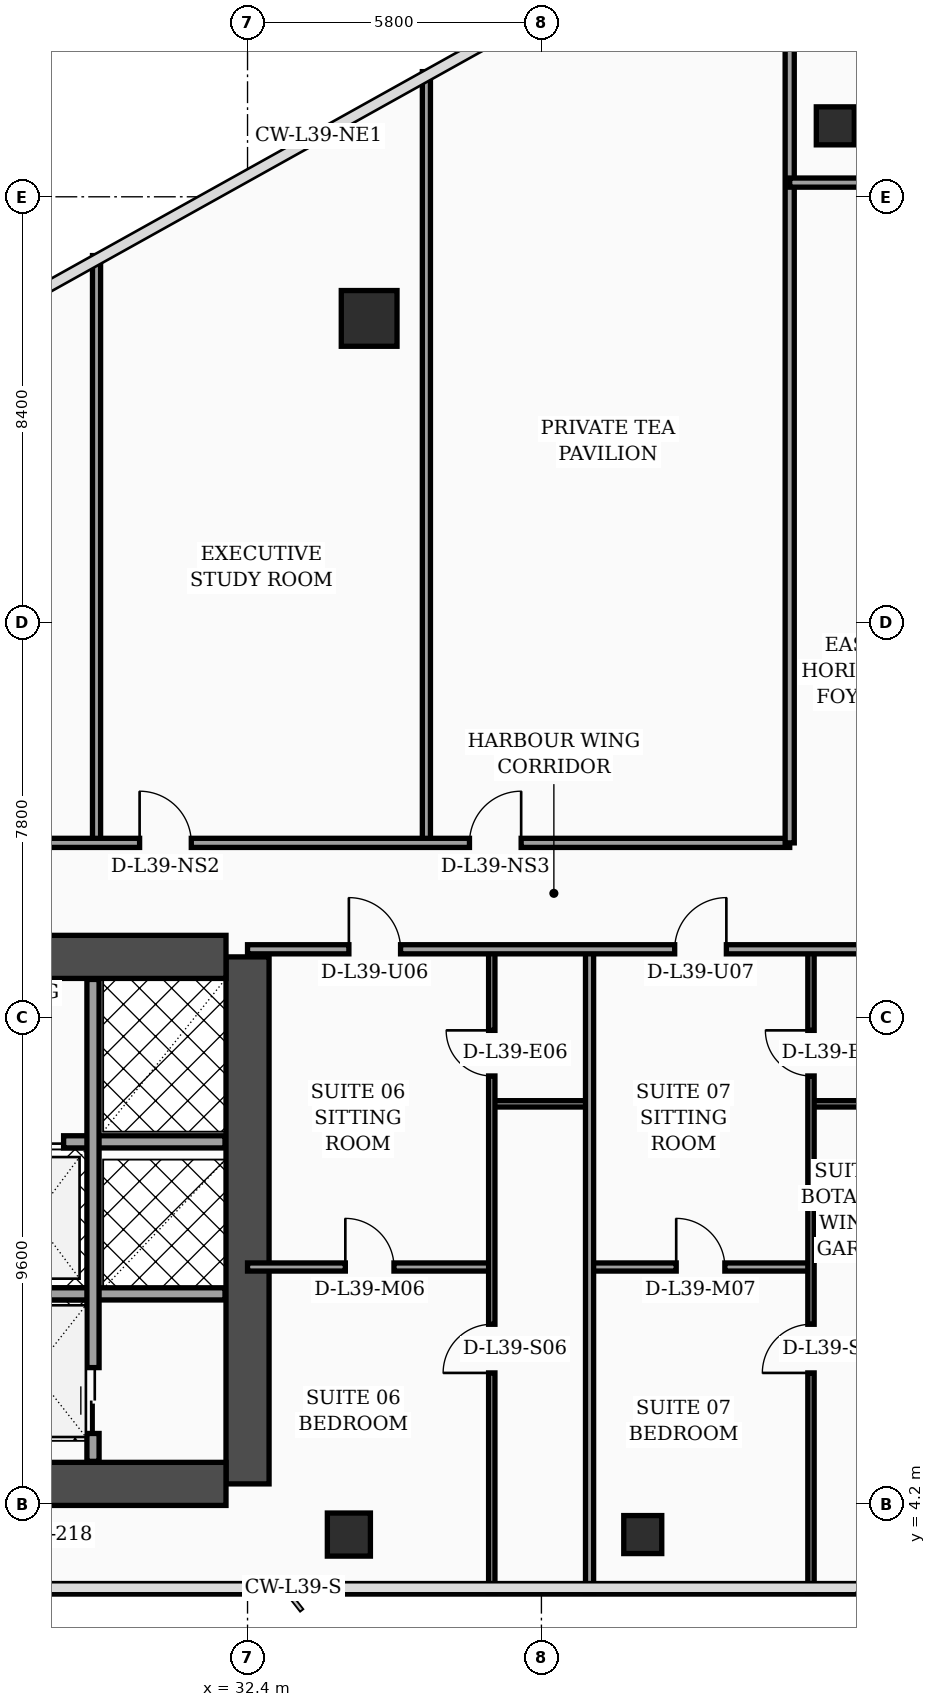
"""IFC4 building model, lengths in metres.
Left out: names, types, materials, properties, quantities, classifications, styles, units other than length and angle.
Written with IfcOpenShell. Run it as: python <this file> out.ifc"""

import sys

from ifc_helpers import new_model, si_unit, direction, frame, frame_2d, origin, origin_2d, place, context, subcontext, project, spatial, rectangle, hollow_rectangle, circle, extrude, element, fill, save


model = new_model("IFC4")
c1 = context("Model", 3, precision=1e-05, world=origin(), true_north=direction((0.0, 1.0)))
c2 = subcontext(c1, "Body", "Model", "MODEL_VIEW")
j1 = project(units=[si_unit("LENGTHUNIT", "METRE"), si_unit("PLANEANGLEUNIT", "RADIAN")], contexts=[c1])
p1 = place(None, origin())
s1 = spatial("IfcSite", under=j1, at=p1, CompositionType="ELEMENT")
p2 = place(p1, origin())
s2 = spatial("IfcBuilding", under=s1, at=p2, CompositionType="ELEMENT")
p3 = place(p2, frame((0.0, 0.0, 159.9)))
s3 = spatial("IfcBuildingStorey", under=s2, at=p3, CompositionType="ELEMENT", Elevation=159.9)
p4 = place(p3, frame((32.4, 4.6, 0.0), z_axis=(0.0, 0.0, 1.0), x_axis=(0.0, 1.0, 0.0)))
e1 = element("IfcWall", 1, at=p4, inside=s3, PredefinedType="SHEAR", context=c2, shape_type="SweptSolid", body=[
    extrude(rectangle(XDim=10.4, YDim=0.85, at=frame_2d((5.2, 0.0))), origin(), (0.0, 0.0, 1.0), 3.56),
])
p5 = place(p3, frame((22.025, 15.0, 0.0), z_axis=(0.0, 0.0, 1.0), x_axis=(1.0, 0.0, 0.0)))
e2 = element("IfcWall", 2, at=p5, inside=s3, PredefinedType="SHEAR", context=c2, shape_type="SweptSolid", body=[
    extrude(rectangle(XDim=9.95, YDim=0.85, at=frame_2d((4.975, 0.0))), origin(), (0.0, 0.0, 1.0), 3.56),
])
p6 = place(p5, frame((4.88, 0.0, 0.0)))
e3 = element("IfcOpeningElement", 3, at=p6, cuts=e2, PredefinedType="OPENING", context=c2, shape_type="SweptSolid", body=[
    extrude(rectangle(XDim=1.1, YDim=2.2, at=frame_2d((0.55, 1.1))), frame((0.0, 0.435, 0.0), z_axis=(0.0, -1.0, 0.0), x_axis=(1.0, 0.0, 0.0)), (0.0, 0.0, 1.0), 0.87),
])
p7 = place(p3, frame((22.025, 4.6, 0.0), z_axis=(0.0, 0.0, 1.0), x_axis=(1.0, 0.0, 0.0)))
e4 = element("IfcWall", 4, at=p7, inside=s3, PredefinedType="SHEAR", context=c2, shape_type="SweptSolid", body=[
    extrude(rectangle(XDim=9.95, YDim=0.85, at=frame_2d((4.975, 0.0))), origin(), (0.0, 0.0, 1.0), 3.56),
])
p8 = place(p3, frame((34.4, 3.6, 0.0), z_axis=(0.0, 0.0, 1.0), x_axis=(1.0, 0.0, 0.0)))
e5 = element("IfcColumn", 5, at=p8, inside=s3, PredefinedType="COLUMN", context=c2, shape_type="SweptSolid", body=[
    extrude(hollow_rectangle(XDim=0.85, YDim=0.85, WallThickness=0.036, at=origin_2d()), origin(), (0.0, 0.0, 1.0), 3.56),
])
p9 = place(p3, frame((40.2, 3.6, 0.0), z_axis=(0.0, 0.0, 1.0), x_axis=(1.0, 0.0, 0.0)))
e6 = element("IfcColumn", 6, at=p9, inside=s3, PredefinedType="COLUMN", context=c2, shape_type="SweptSolid", body=[
    extrude(hollow_rectangle(XDim=0.75, YDim=0.75, WallThickness=0.032, at=origin_2d()), origin(), (0.0, 0.0, 1.0), 3.56),
])
p10 = place(p3, frame((34.8, 27.6, 0.0), z_axis=(0.0, 0.0, 1.0), x_axis=(1.0, 0.0, 0.0)))
e7 = element("IfcColumn", 7, at=p10, inside=s3, PredefinedType="COLUMN", context=c2, shape_type="SweptSolid", body=[
    extrude(circle(Radius=0.55, at=origin_2d()), origin(), (0.0, 0.0, 1.0), 3.56),
])
p11 = place(p3, frame((44.0, 31.4, 0.0), z_axis=(0.0, 0.0, 1.0), x_axis=(1.0, 0.0, 0.0)))
e8 = element("IfcColumn", 8, at=p11, inside=s3, PredefinedType="COLUMN", context=c2, shape_type="SweptSolid", body=[
    extrude(hollow_rectangle(XDim=0.75, YDim=0.75, WallThickness=0.032, at=origin_2d()), origin(), (0.0, 0.0, 1.0), 3.56),
])
p12 = place(p3, frame((27.02, 11.35, 0.0), z_axis=(0.0, 0.0, 1.0), x_axis=(1.0, 0.0, 0.0)))
e9 = element("IfcWall", 9, at=p12, inside=s3, PredefinedType="SOLIDWALL", context=c2, shape_type="SweptSolid", body=[
    extrude(rectangle(XDim=4.935, YDim=0.24, at=frame_2d((2.468, 0.0))), origin(), (0.0, 0.0, 1.0), 3.56),
])
p13 = place(p12, frame((0.45, 0.0, 0.0)))
e10 = element("IfcOpeningElement", 10, at=p13, cuts=e9, PredefinedType="OPENING", context=c2, shape_type="SweptSolid", body=[
    extrude(rectangle(XDim=1.3, YDim=2.35, at=frame_2d((0.65, 1.175))), frame((0.0, 0.13, 0.0), z_axis=(0.0, -1.0, 0.0), x_axis=(1.0, 0.0, 0.0)), (0.0, 0.0, 1.0), 0.26),
])
p14 = place(p3, frame((27.02, 8.35, 0.0), z_axis=(0.0, 0.0, 1.0), x_axis=(1.0, 0.0, 0.0)))
e11 = element("IfcWall", 11, at=p14, inside=s3, PredefinedType="SOLIDWALL", context=c2, shape_type="SweptSolid", body=[
    extrude(rectangle(XDim=4.935, YDim=0.24, at=frame_2d((2.468, 0.0))), origin(), (0.0, 0.0, 1.0), 3.56),
])
p15 = place(p3, frame((29.35, 5.045, 0.0), z_axis=(0.0, 0.0, 1.0), x_axis=(0.0, 1.0, 0.0)))
e12 = element("IfcWall", 12, at=p15, inside=s3, PredefinedType="SOLIDWALL", context=c2, shape_type="SweptSolid", body=[
    extrude(rectangle(XDim=9.51, YDim=0.24, at=frame_2d((4.755, 0.0))), origin(), (0.0, 0.0, 1.0), 3.56),
])
p16 = place(p15, frame((0.55, 0.0, 0.0)))
e13 = element("IfcOpeningElement", 13, at=p16, cuts=e12, PredefinedType="OPENING", context=c2, shape_type="SweptSolid", body=[
    extrude(rectangle(XDim=1.3, YDim=2.35, at=frame_2d((0.65, 1.175))), frame((0.0, 0.13, 0.0), z_axis=(0.0, -1.0, 0.0), x_axis=(1.0, 0.0, 0.0)), (0.0, 0.0, 1.0), 0.26),
])
p17 = place(p3, frame((37.22, 12.1, 0.0), z_axis=(0.0, 0.0, 1.0), x_axis=(1.0, 0.0, 0.0)))
e14 = element("IfcWall", 14, at=p17, inside=s3, PredefinedType="PARTITIONING", context=c2, shape_type="SweptSolid", body=[
    extrude(rectangle(XDim=1.93, YDim=0.125, at=frame_2d((0.965, 0.0))), origin(), (0.0, 0.0, 1.0), 3.56),
])
p18 = place(p3, frame((32.4, 8.88, 0.0), z_axis=(0.0, 0.0, 1.0), x_axis=(1.0, 0.0, 0.0)))
e15 = element("IfcWall", 15, at=p18, inside=s3, PredefinedType="PARTITIONING", context=c2, shape_type="SweptSolid", body=[
    extrude(rectangle(XDim=4.82, YDim=0.16, at=frame_2d((2.41, 0.0))), origin(), (0.0, 0.0, 1.0), 2.94),
])
p19 = place(p18, frame((1.93, 0.0, 0.0)))
e16 = element("IfcOpeningElement", 16, at=p19, cuts=e15, PredefinedType="OPENING", context=c2, shape_type="SweptSolid", body=[
    extrude(rectangle(XDim=0.96, YDim=2.2, at=frame_2d((0.48, 1.1))), frame((0.0, 0.09, 0.0), z_axis=(0.0, -1.0, 0.0), x_axis=(1.0, 0.0, 0.0)), (0.0, 0.0, 1.0), 0.18),
])
p20 = place(p3, frame((37.22, 2.44, 0.0), z_axis=(0.0, 0.0, 1.0), x_axis=(0.0, 1.0, 0.0)))
e17 = element("IfcWall", 17, at=p20, inside=s3, PredefinedType="PARTITIONING", context=c2, shape_type="SweptSolid", body=[
    extrude(rectangle(XDim=12.71, YDim=0.125, at=frame_2d((6.355, 0.0))), origin(), (0.0, 0.0, 1.0), 2.94),
])
p21 = place(p20, frame((4.35, 0.0, 0.0)))
e18 = element("IfcOpeningElement", 18, at=p21, cuts=e17, PredefinedType="OPENING", context=c2, shape_type="SweptSolid", body=[
    extrude(rectangle(XDim=0.96, YDim=2.2, at=frame_2d((0.48, 1.1))), frame((0.0, 0.073, 0.0), z_axis=(0.0, -1.0, 0.0), x_axis=(1.0, 0.0, 0.0)), (0.0, 0.0, 1.0), 0.145),
])
p22 = place(p20, frame((10.21, 0.0, 0.0)))
e19 = element("IfcOpeningElement", 19, at=p22, cuts=e17, PredefinedType="OPENING", context=c2, shape_type="SweptSolid", body=[
    extrude(rectangle(XDim=0.9, YDim=2.15, at=frame_2d((0.45, 1.075))), frame((0.0, 0.073, 0.0), z_axis=(0.0, -1.0, 0.0), x_axis=(1.0, 0.0, 0.0)), (0.0, 0.0, 1.0), 0.145),
])
p23 = place(p3, frame((43.52, 12.1, 0.0), z_axis=(0.0, 0.0, 1.0), x_axis=(1.0, 0.0, 0.0)))
e20 = element("IfcWall", 20, at=p23, inside=s3, PredefinedType="PARTITIONING", context=c2, shape_type="SweptSolid", body=[
    extrude(rectangle(XDim=1.93, YDim=0.125, at=frame_2d((0.965, 0.0))), origin(), (0.0, 0.0, 1.0), 3.56),
])
p24 = place(p3, frame((39.15, 8.88, 0.0), z_axis=(0.0, 0.0, 1.0), x_axis=(1.0, 0.0, 0.0)))
e21 = element("IfcWall", 21, at=p24, inside=s3, PredefinedType="PARTITIONING", context=c2, shape_type="SweptSolid", body=[
    extrude(rectangle(XDim=4.37, YDim=0.16, at=frame_2d((2.185, 0.0))), origin(), (0.0, 0.0, 1.0), 3.56),
])
p25 = place(p24, frame((1.71, 0.0, 0.0)))
e22 = element("IfcOpeningElement", 22, at=p25, cuts=e21, PredefinedType="OPENING", context=c2, shape_type="SweptSolid", body=[
    extrude(rectangle(XDim=0.96, YDim=2.2, at=frame_2d((0.48, 1.1))), frame((0.0, 0.09, 0.0), z_axis=(0.0, -1.0, 0.0), x_axis=(1.0, 0.0, 0.0)), (0.0, 0.0, 1.0), 0.18),
])
p26 = place(p3, frame((43.52, 2.44, 0.0), z_axis=(0.0, 0.0, 1.0), x_axis=(0.0, 1.0, 0.0)))
e23 = element("IfcWall", 23, at=p26, inside=s3, PredefinedType="PARTITIONING", context=c2, shape_type="SweptSolid", body=[
    extrude(rectangle(XDim=12.71, YDim=0.125, at=frame_2d((6.355, 0.0))), origin(), (0.0, 0.0, 1.0), 3.04),
])
p27 = place(p26, frame((4.35, 0.0, 0.0)))
e24 = element("IfcOpeningElement", 24, at=p27, cuts=e23, PredefinedType="OPENING", context=c2, shape_type="SweptSolid", body=[
    extrude(rectangle(XDim=0.96, YDim=2.2, at=frame_2d((0.48, 1.1))), frame((0.0, 0.073, 0.0), z_axis=(0.0, -1.0, 0.0), x_axis=(1.0, 0.0, 0.0)), (0.0, 0.0, 1.0), 0.145),
])
p28 = place(p26, frame((10.21, 0.0, 0.0)))
e25 = element("IfcOpeningElement", 25, at=p28, cuts=e23, PredefinedType="OPENING", context=c2, shape_type="SweptSolid", body=[
    extrude(rectangle(XDim=0.9, YDim=2.15, at=frame_2d((0.45, 1.075))), frame((0.0, 0.073, 0.0), z_axis=(0.0, -1.0, 0.0), x_axis=(1.0, 0.0, 0.0)), (0.0, 0.0, 1.0), 0.145),
])
p29 = place(p3, frame((39.15, 2.44, 0.0), z_axis=(0.0, 0.0, 1.0), x_axis=(0.0, 1.0, 0.0)))
e26 = element("IfcWall", 26, at=p29, inside=s3, PredefinedType="PARTITIONING", context=c2, shape_type="SweptSolid", body=[
    extrude(rectangle(XDim=12.71, YDim=0.16, at=frame_2d((6.355, 0.0))), origin(), (0.0, 0.0, 1.0), 2.94),
])
p30 = place(p3, frame((32.4, 15.15, 0.0), z_axis=(0.0, 0.0, 1.0), x_axis=(1.0, 0.0, 0.0)))
e27 = element("IfcWall", 27, at=p30, inside=s3, PredefinedType="PARTITIONING", context=c2, shape_type="SweptSolid", body=[
    extrude(rectangle(XDim=13.05, YDim=0.18, at=frame_2d((6.525, 0.0))), origin(), (0.0, 0.0, 1.0), 2.94),
])
p31 = place(p30, frame((2.0, 0.0, 0.0)))
e28 = element("IfcOpeningElement", 28, at=p31, cuts=e27, PredefinedType="OPENING", context=c2, shape_type="SweptSolid", body=[
    extrude(rectangle(XDim=1.02, YDim=2.2, at=frame_2d((0.51, 1.1))), frame((0.0, 0.1, 0.0), z_axis=(0.0, -1.0, 0.0), x_axis=(1.0, 0.0, 0.0)), (0.0, 0.0, 1.0), 0.2),
])
p32 = place(p30, frame((8.43, 0.0, 0.0)))
e29 = element("IfcOpeningElement", 29, at=p32, cuts=e27, PredefinedType="OPENING", context=c2, shape_type="SweptSolid", body=[
    extrude(rectangle(XDim=1.02, YDim=2.2, at=frame_2d((0.51, 1.1))), frame((0.0, 0.1, 0.0), z_axis=(0.0, -1.0, 0.0), x_axis=(1.0, 0.0, 0.0)), (0.0, 0.0, 1.0), 0.2),
])
p33 = place(p3, frame((29.42, 17.25, 0.0), z_axis=(0.0, 0.0, 1.0), x_axis=(0.0, 1.0, 0.0)))
e30 = element("IfcWall", 30, at=p33, inside=s3, PredefinedType="PARTITIONING", context=c2, shape_type="SweptSolid", body=[
    extrude(rectangle(XDim=11.59, YDim=0.16, at=frame_2d((5.795, 0.0))), origin(), (0.0, 0.0, 1.0), 2.94),
])
p34 = place(p3, frame((35.93, 17.25, 0.0), z_axis=(0.0, 0.0, 1.0), x_axis=(0.0, 1.0, 0.0)))
e31 = element("IfcWall", 31, at=p34, inside=s3, PredefinedType="PARTITIONING", context=c2, shape_type="SweptSolid", body=[
    extrude(rectangle(XDim=15.22, YDim=0.16, at=frame_2d((7.61, 0.0))), origin(), (0.0, 0.0, 1.0), 2.94),
])
p35 = place(p3, frame((21.5, 17.25, 0.0), z_axis=(0.0, 0.0, 1.0), x_axis=(1.0, 0.0, 0.0)))
e32 = element("IfcWall", 32, at=p35, inside=s3, PredefinedType="PARTITIONING", context=c2, shape_type="SweptSolid", body=[
    extrude(rectangle(XDim=21.6, YDim=0.18, at=frame_2d((10.8, 0.0))), origin(), (0.0, 0.0, 1.0), 2.94),
])
p36 = place(p35, frame((0.95, 0.0, 0.0)))
e33 = element("IfcOpeningElement", 33, at=p36, cuts=e32, PredefinedType="OPENING", context=c2, shape_type="SweptSolid", body=[
    extrude(rectangle(XDim=1.02, YDim=2.2, at=frame_2d((0.51, 1.1))), frame((0.0, 0.1, 0.0), z_axis=(0.0, -1.0, 0.0), x_axis=(1.0, 0.0, 0.0)), (0.0, 0.0, 1.0), 0.2),
])
p37 = place(p35, frame((8.77, 0.0, 0.0)))
e34 = element("IfcOpeningElement", 34, at=p37, cuts=e32, PredefinedType="OPENING", context=c2, shape_type="SweptSolid", body=[
    extrude(rectangle(XDim=1.02, YDim=2.2, at=frame_2d((0.51, 1.1))), frame((0.0, 0.1, 0.0), z_axis=(0.0, -1.0, 0.0), x_axis=(1.0, 0.0, 0.0)), (0.0, 0.0, 1.0), 0.2),
])
p38 = place(p35, frame((15.28, 0.0, 0.0)))
e35 = element("IfcOpeningElement", 35, at=p38, cuts=e32, PredefinedType="OPENING", context=c2, shape_type="SweptSolid", body=[
    extrude(rectangle(XDim=1.02, YDim=2.2, at=frame_2d((0.51, 1.1))), frame((0.0, 0.1, 0.0), z_axis=(0.0, -1.0, 0.0), x_axis=(1.0, 0.0, 0.0)), (0.0, 0.0, 1.0), 0.2),
])
p39 = place(p3, frame((43.1, 17.25, 0.0), z_axis=(0.0, 0.0, 1.0), x_axis=(0.0, 1.0, 0.0)))
e36 = element("IfcWall", 36, at=p39, inside=s3, PredefinedType="PARTITIONING", context=c2, shape_type="SweptSolid", body=[
    extrude(rectangle(XDim=19.21, YDim=0.18, at=frame_2d((9.605, 0.0))), origin(), (0.0, 0.0, 1.0), 2.94),
])
p40 = place(p3, frame((43.1, 30.28, 0.0), z_axis=(0.0, 0.0, 1.0), x_axis=(1.0, 0.0, 0.0)))
e37 = element("IfcWall", 37, at=p40, inside=s3, PredefinedType="PARTITIONING", context=c2, shape_type="SweptSolid", body=[
    extrude(rectangle(XDim=2.35, YDim=0.18, at=frame_2d((1.175, 0.0))), origin(), (0.0, 0.0, 1.0), 2.94),
])
p41 = place(p13, origin())
e38 = element("IfcDoor", 38, at=p41, inside=s3, OperationType="DOUBLE_DOOR_SLIDING", PredefinedType="DOOR", context=c2, shape_type="SweptSolid", body=[
    extrude(rectangle(XDim=1.3, YDim=2.35, at=frame_2d((0.65, 1.175))), frame((0.0, 0.025, 0.0), z_axis=(0.0, -1.0, 0.0), x_axis=(1.0, 0.0, 0.0)), (0.0, 0.0, 1.0), 0.05),
])
fill(e10, e38)
p42 = place(p16, origin())
e39 = element("IfcDoor", 39, at=p42, inside=s3, OperationType="DOUBLE_DOOR_SLIDING", PredefinedType="DOOR", context=c2, shape_type="SweptSolid", body=[
    extrude(rectangle(XDim=1.3, YDim=2.35, at=frame_2d((0.65, 1.175))), frame((0.0, 0.025, 0.0), z_axis=(0.0, -1.0, 0.0), x_axis=(1.0, 0.0, 0.0)), (0.0, 0.0, 1.0), 0.05),
])
fill(e13, e39)
p43 = place(p19, origin())
e40 = element("IfcDoor", 40, at=p43, inside=s3, OperationType="SINGLE_SWING_LEFT", PredefinedType="DOOR", context=c2, shape_type="SweptSolid", body=[
    extrude(rectangle(XDim=0.96, YDim=2.2, at=frame_2d((0.48, 1.1))), frame((0.0, 0.025, 0.0), z_axis=(0.0, -1.0, 0.0), x_axis=(1.0, 0.0, 0.0)), (0.0, 0.0, 1.0), 0.05),
])
fill(e16, e40)
p44 = place(p21, origin())
e41 = element("IfcDoor", 41, at=p44, inside=s3, OperationType="SINGLE_SWING_LEFT", PredefinedType="DOOR", context=c2, shape_type="SweptSolid", body=[
    extrude(rectangle(XDim=0.96, YDim=2.2, at=frame_2d((0.48, 1.1))), frame((0.0, 0.025, 0.0), z_axis=(0.0, -1.0, 0.0), x_axis=(1.0, 0.0, 0.0)), (0.0, 0.0, 1.0), 0.05),
])
fill(e18, e41)
p45 = place(p22, origin())
e42 = element("IfcDoor", 42, at=p45, inside=s3, OperationType="SINGLE_SWING_RIGHT", PredefinedType="DOOR", context=c2, shape_type="SweptSolid", body=[
    extrude(rectangle(XDim=0.9, YDim=2.15, at=frame_2d((0.45, 1.075))), frame((0.0, 0.025, 0.0), z_axis=(0.0, -1.0, 0.0), x_axis=(1.0, 0.0, 0.0)), (0.0, 0.0, 1.0), 0.05),
])
fill(e19, e42)
p46 = place(p25, origin())
e43 = element("IfcDoor", 43, at=p46, inside=s3, OperationType="SINGLE_SWING_LEFT", PredefinedType="DOOR", context=c2, shape_type="SweptSolid", body=[
    extrude(rectangle(XDim=0.96, YDim=2.2, at=frame_2d((0.48, 1.1))), frame((0.0, 0.025, 0.0), z_axis=(0.0, -1.0, 0.0), x_axis=(1.0, 0.0, 0.0)), (0.0, 0.0, 1.0), 0.05),
])
fill(e22, e43)
p47 = place(p27, origin())
e44 = element("IfcDoor", 44, at=p47, inside=s3, OperationType="SINGLE_SWING_LEFT", PredefinedType="DOOR", context=c2, shape_type="SweptSolid", body=[
    extrude(rectangle(XDim=0.96, YDim=2.2, at=frame_2d((0.48, 1.1))), frame((0.0, 0.025, 0.0), z_axis=(0.0, -1.0, 0.0), x_axis=(1.0, 0.0, 0.0)), (0.0, 0.0, 1.0), 0.05),
])
fill(e24, e44)
p48 = place(p28, origin())
e45 = element("IfcDoor", 45, at=p48, inside=s3, OperationType="SINGLE_SWING_RIGHT", PredefinedType="DOOR", context=c2, shape_type="SweptSolid", body=[
    extrude(rectangle(XDim=0.9, YDim=2.15, at=frame_2d((0.45, 1.075))), frame((0.0, 0.025, 0.0), z_axis=(0.0, -1.0, 0.0), x_axis=(1.0, 0.0, 0.0)), (0.0, 0.0, 1.0), 0.05),
])
fill(e25, e45)
p49 = place(p31, origin())
e46 = element("IfcDoor", 46, at=p49, inside=s3, OperationType="SINGLE_SWING_LEFT", PredefinedType="DOOR", context=c2, shape_type="SweptSolid", body=[
    extrude(rectangle(XDim=1.02, YDim=2.2, at=frame_2d((0.51, 1.1))), frame((0.0, 0.025, 0.0), z_axis=(0.0, -1.0, 0.0), x_axis=(1.0, 0.0, 0.0)), (0.0, 0.0, 1.0), 0.05),
])
fill(e28, e46)
p50 = place(p32, origin())
e47 = element("IfcDoor", 47, at=p50, inside=s3, OperationType="SINGLE_SWING_RIGHT", PredefinedType="DOOR", context=c2, shape_type="SweptSolid", body=[
    extrude(rectangle(XDim=1.02, YDim=2.2, at=frame_2d((0.51, 1.1))), frame((0.0, 0.025, 0.0), z_axis=(0.0, -1.0, 0.0), x_axis=(1.0, 0.0, 0.0)), (0.0, 0.0, 1.0), 0.05),
])
fill(e29, e47)
p51 = place(p37, origin())
e48 = element("IfcDoor", 48, at=p51, inside=s3, OperationType="SINGLE_SWING_LEFT", PredefinedType="DOOR", context=c2, shape_type="SweptSolid", body=[
    extrude(rectangle(XDim=1.02, YDim=2.2, at=frame_2d((0.51, 1.1))), frame((0.0, 0.025, 0.0), z_axis=(0.0, -1.0, 0.0), x_axis=(1.0, 0.0, 0.0)), (0.0, 0.0, 1.0), 0.05),
])
fill(e34, e48)
p52 = place(p38, origin())
e49 = element("IfcDoor", 49, at=p52, inside=s3, OperationType="SINGLE_SWING_RIGHT", PredefinedType="DOOR", context=c2, shape_type="SweptSolid", body=[
    extrude(rectangle(XDim=1.02, YDim=2.2, at=frame_2d((0.51, 1.1))), frame((0.0, 0.025, 0.0), z_axis=(0.0, -1.0, 0.0), x_axis=(1.0, 0.0, 0.0)), (0.0, 0.0, 1.0), 0.05),
])
fill(e35, e49)
save(model, sys.argv[1])
